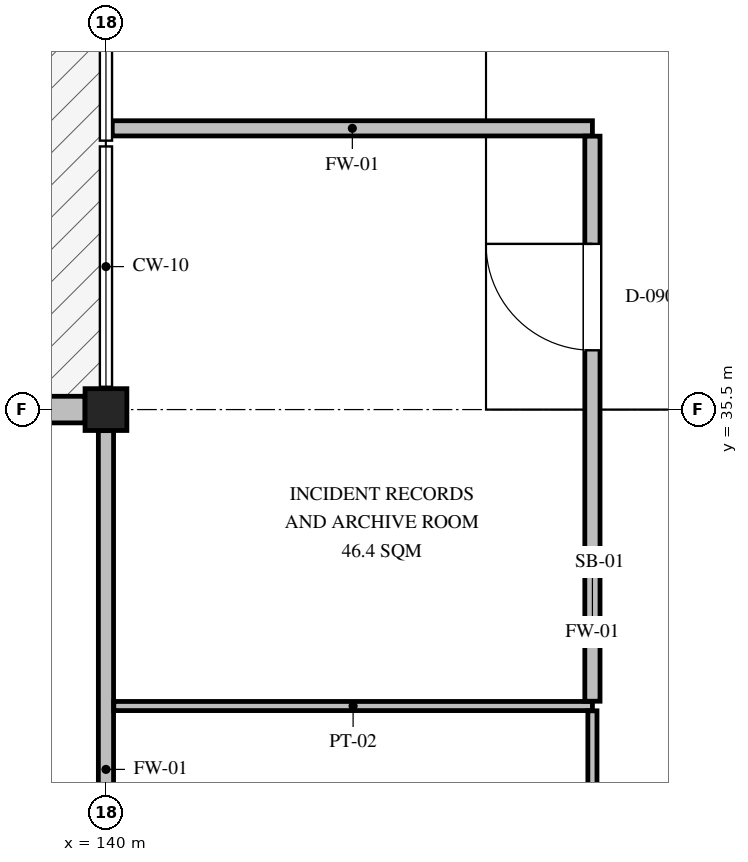
"""IFC4 building model, lengths in metres.
Left out: names, types, materials, properties, quantities, classifications, styles, units other than length and angle.
Written with IfcOpenShell. Run it as: python <this file> out.ifc"""

import sys

from ifc_helpers import new_model, si_unit, direction, frame, frame_2d, origin, origin_2d, place, context, subcontext, project, spatial, rectangle, hollow_rectangle, extrude, element, fill, save


model = new_model("IFC4")
c1 = context("Model", 3, precision=1e-05, world=origin(), true_north=direction((0.0, 1.0)))
c2 = subcontext(c1, "Body", "Model", "MODEL_VIEW")
j1 = project(units=[si_unit("LENGTHUNIT", "METRE"), si_unit("PLANEANGLEUNIT", "RADIAN")], contexts=[c1])
p1 = place(None, origin())
s1 = spatial("IfcSite", under=j1, at=p1, CompositionType="ELEMENT")
p2 = place(p1, origin())
s2 = spatial("IfcBuilding", under=s1, at=p2, CompositionType="ELEMENT")
p3 = place(p2, frame((0.0, 0.0, 0.45)))
s3 = spatial("IfcBuildingStorey", under=s2, at=p3, CompositionType="ELEMENT", Elevation=0.45)
p4 = place(p3, frame((140.0, 35.5, -0.45), z_axis=(0.0, 0.0, 1.0), x_axis=(1.0, 0.0, 0.0)))
e1 = element("IfcColumn", 1, at=p4, inside=s3, PredefinedType="COLUMN", context=c2, shape_type="SweptSolid", body=[
    extrude(hollow_rectangle(XDim=0.55, YDim=0.55, WallThickness=0.026, at=origin_2d()), origin(), (0.0, 0.0, 1.0), 5.85),
])
p5 = place(p3, frame((132.275, 35.5, 0.0), z_axis=(0.0, 0.0, 1.0), x_axis=(1.0, 0.0, 0.0)))
e2 = element("IfcWall", 2, at=p5, inside=s3, PredefinedType="SOLIDWALL", context=c2, shape_type="SweptSolid", body=[
    extrude(rectangle(XDim=7.45, YDim=0.35, at=frame_2d((3.725, 0.0))), origin(), (0.0, 0.0, 1.0), 4.394),
])
p6 = place(p5, frame((1.725, 0.0, 0.0)))
e3 = element("IfcOpeningElement", 3, at=p6, cuts=e2, PredefinedType="OPENING", context=c2, shape_type="SweptSolid", body=[
    extrude(rectangle(XDim=4.0, YDim=4.244, at=frame_2d((2.0, 2.122))), frame((0.0, 0.185, 0.0), z_axis=(0.0, -1.0, 0.0), x_axis=(1.0, 0.0, 0.0)), (0.0, 0.0, 1.0), 0.37),
])
p7 = place(p3, frame((140.0, 28.777, 0.0), z_axis=(0.0, 0.0, 1.0), x_axis=(0.0, 1.0, 0.0)))
e4 = element("IfcWall", 4, at=p7, inside=s3, PredefinedType="PARTITIONING", context=c2, shape_type="SweptSolid", body=[
    extrude(rectangle(XDim=6.446, YDim=0.2, at=frame_2d((3.223, 0.0))), origin(), (0.0, 0.0, 1.0), 4.694),
])
p8 = place(p3, frame((140.103, 31.6, 0.0), z_axis=(0.0, 0.0, 1.0), x_axis=(1.0, 0.0, 0.0)))
e5 = element("IfcWall", 5, at=p8, inside=s3, PredefinedType="PARTITIONING", context=c2, shape_type="SweptSolid", body=[
    extrude(rectangle(XDim=6.297, YDim=0.12, at=frame_2d((3.148, 0.0))), origin(), (0.0, 0.0, 1.0), 5.2),
])
p9 = place(p3, frame((146.4, 22.503, 0.0), z_axis=(0.0, 0.0, 1.0), x_axis=(0.0, 1.0, 0.0)))
e6 = element("IfcWall", 6, at=p9, inside=s3, PredefinedType="PARTITIONING", context=c2, shape_type="SweptSolid", body=[
    extrude(rectangle(XDim=9.034, YDim=0.12, at=frame_2d((4.517, 0.0))), origin(), (0.0, 0.0, 1.0), 4.894),
])
p10 = place(p9, frame((4.027, 0.0, 0.0)))
e7 = element("IfcOpeningElement", 7, at=p10, cuts=e6, PredefinedType="OPENING", context=c2, shape_type="SweptSolid", body=[
    extrude(rectangle(XDim=0.98, YDim=2.1, at=frame_2d((0.49, 1.05))), frame((0.0, 0.07, 0.0), z_axis=(0.0, -1.0, 0.0), x_axis=(1.0, 0.0, 0.0)), (0.0, 0.0, 1.0), 0.14),
])
p11 = place(p3, frame((140.083, 39.2, 0.0), z_axis=(0.0, 0.0, 1.0), x_axis=(1.0, 0.0, 0.0)))
e8 = element("IfcWall", 8, at=p11, inside=s3, PredefinedType="PARTITIONING", context=c2, shape_type="SweptSolid", body=[
    extrude(rectangle(XDim=6.317, YDim=0.2, at=frame_2d((3.158, 0.0))), origin(), (0.0, 0.0, 1.0), 5.2),
])
p12 = place(p3, frame((146.4, 31.663, 0.0), z_axis=(0.0, 0.0, 1.0), x_axis=(0.0, 1.0, 0.0)))
e9 = element("IfcWall", 9, at=p12, inside=s3, PredefinedType="PARTITIONING", context=c2, shape_type="SweptSolid", body=[
    extrude(rectangle(XDim=7.434, YDim=0.2, at=frame_2d((3.717, 0.0))), origin(), (0.0, 0.0, 1.0), 4.994),
])
p13 = place(p12, frame((4.617, 0.0, 0.0)))
e10 = element("IfcOpeningElement", 10, at=p13, cuts=e9, PredefinedType="OPENING", context=c2, shape_type="SweptSolid", body=[
    extrude(rectangle(XDim=1.4, YDim=2.2, at=frame_2d((0.7, 1.1))), frame((0.0, 0.11, 0.0), z_axis=(0.0, -1.0, 0.0), x_axis=(1.0, 0.0, 0.0)), (0.0, 0.0, 1.0), 0.22),
])
p14 = place(p13, origin())
e11 = element("IfcDoor", 11, at=p14, inside=s3, OperationType="SINGLE_SWING_RIGHT", PredefinedType="DOOR", context=c2, shape_type="SweptSolid", body=[
    extrude(rectangle(XDim=1.4, YDim=2.2, at=frame_2d((0.7, 1.1))), frame((0.0, 0.025, 0.0), z_axis=(0.0, -1.0, 0.0), x_axis=(1.0, 0.0, 0.0)), (0.0, 0.0, 1.0), 0.05),
])
fill(e10, e11)
save(model, sys.argv[1])
